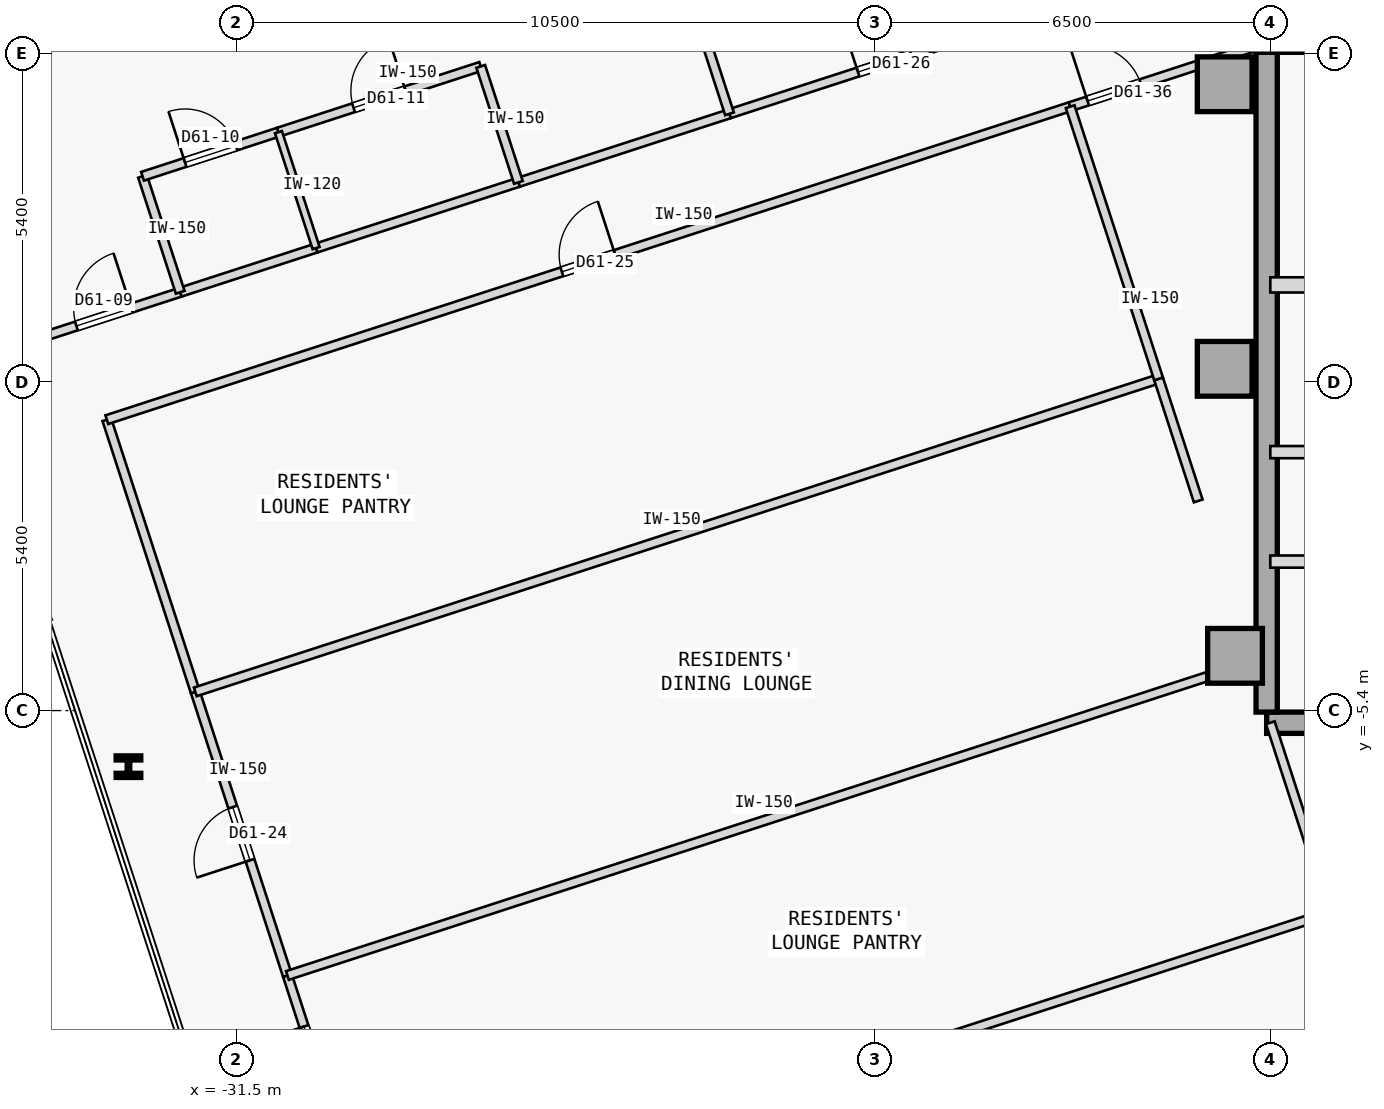
"""IFC4 building model, lengths in metres.
Left out: names, types, materials, properties, quantities, classifications, styles, units other than length and angle.
Written with IfcOpenShell. Run it as: python <this file> out.ifc"""

import sys

from ifc_helpers import new_model, si_unit, direction, frame, frame_2d, origin, origin_2d, place, context, subcontext, project, spatial, rectangle, i_section, extrude, element, fill, save


model = new_model("IFC4")
c1 = context("Model", 3, precision=1e-05, world=origin(), true_north=direction((0.0, 1.0)))
c2 = subcontext(c1, "Body", "Model", "MODEL_VIEW")
j1 = project(units=[si_unit("LENGTHUNIT", "METRE"), si_unit("PLANEANGLEUNIT", "RADIAN")], contexts=[c1])
p1 = place(None, origin())
s1 = spatial("IfcSite", under=j1, at=p1, CompositionType="ELEMENT")
p2 = place(p1, origin())
s2 = spatial("IfcBuilding", under=s1, at=p2, CompositionType="ELEMENT")
p3 = place(p2, frame((0.0, 0.0, 231.0)))
s3 = spatial("IfcBuildingStorey", under=s2, at=p3, CompositionType="ELEMENT", Elevation=231.0)
for number, where, z_axis, x_axis in (
    (1, (-15.25, 4.9, 0.0), (0.0, 0.0, 1.0), (1.0, 0.0, 0.0)),
    (2, (-15.25, 0.22, 0.0), (0.0, 0.0, 1.0), (1.0, 0.0, 0.0)),
    (3, (-15.08, -4.5, 0.0), (0.0, 0.0, 1.0), (1.0, 0.0, 0.0)),
):
    element("IfcColumn", number, at=place(p3, frame(where, z_axis=z_axis, x_axis=x_axis)), inside=s3, PredefinedType="COLUMN", context=c2, shape_type="SweptSolid", body=[
        extrude(rectangle(XDim=0.9, YDim=0.9, at=origin_2d()), origin(), (0.0, 0.0, 1.0), 3.35),
    ])
p4 = place(p3, frame((-14.56, -5.6, 0.0), z_axis=(0.0, 0.0, 1.0), x_axis=(1.0, 0.0, 0.0)))
e4 = element("IfcWall", 4, at=p4, inside=s3, PredefinedType="SHEAR", context=c2, shape_type="SweptSolid", body=[
    extrude(rectangle(XDim=10.86, YDim=0.35, at=frame_2d((5.43, 0.0))), origin(), (0.0, 0.0, 1.0), 3.125),
])
p5 = place(p3, frame((-14.56, -5.425, 0.0), z_axis=(0.0, 0.0, 1.0), x_axis=(0.0, 1.0, 0.0)))
e5 = element("IfcWall", 5, at=p5, inside=s3, PredefinedType="SHEAR", context=c2, shape_type="SweptSolid", body=[
    extrude(rectangle(XDim=10.85, YDim=0.35, at=frame_2d((5.425, 0.0))), origin(), (0.0, 0.0, 1.0), 3.125),
])
p6 = place(p3, frame((-33.278, -6.322, 0.0), z_axis=(0.0, 0.0, 1.0), x_axis=(1.0, 0.0, 0.0)))
e6 = element("IfcColumn", 6, at=p6, inside=s3, PredefinedType="COLUMN", context=c2, shape_type="SweptSolid", body=[
    extrude(i_section(OverallWidth=0.405, OverallDepth=0.355, WebThickness=0.042, FlangeThickness=0.068, FilletRadius=0.015, at=origin_2d()), origin(), (0.0, 0.0, 1.0), 3.35),
])
p7 = place(p3, frame((-14.5, 1.6, 0.0), z_axis=(0.0, 0.0, 1.0), x_axis=(1.0, 0.0, 0.0)))
e7 = element("IfcWall", 7, at=p7, inside=s3, PredefinedType="STANDARD", context=c2, shape_type="SweptSolid", body=[
    extrude(rectangle(XDim=3.6, YDim=0.25, at=frame_2d((1.8, 0.0))), origin(), (0.0, 0.0, 1.0), 3.125),
])
p8 = place(p7, frame((0.92, 0.0, 0.0)))
e8 = element("IfcOpeningElement", 8, at=p8, cuts=e7, PredefinedType="OPENING", context=c2, shape_type="SweptSolid", body=[
    extrude(rectangle(XDim=1.05, YDim=2.15, at=frame_2d((0.525, 1.075))), frame((0.0, 0.135, 0.0), z_axis=(0.0, -1.0, 0.0), x_axis=(1.0, 0.0, 0.0)), (0.0, 0.0, 1.0), 0.27),
])
p9 = place(p3, frame((-14.5, -1.15, 0.0), z_axis=(0.0, 0.0, 1.0), x_axis=(1.0, 0.0, 0.0)))
e9 = element("IfcWall", 9, at=p9, inside=s3, PredefinedType="STANDARD", context=c2, shape_type="SweptSolid", body=[
    extrude(rectangle(XDim=2.95, YDim=0.2, at=frame_2d((1.475, 0.0))), origin(), (0.0, 0.0, 1.0), 3.125),
])
p10 = place(p9, frame((0.75, 0.0, 0.0)))
e10 = element("IfcOpeningElement", 10, at=p10, cuts=e9, PredefinedType="OPENING", context=c2, shape_type="SweptSolid", body=[
    extrude(rectangle(XDim=1.05, YDim=2.18, at=frame_2d((0.525, 1.09))), frame((0.0, 0.11, 0.0), z_axis=(0.0, -1.0, 0.0), x_axis=(1.0, 0.0, 0.0)), (0.0, 0.0, 1.0), 0.22),
])
p11 = place(p3, frame((-14.5, -2.95, 0.0), z_axis=(0.0, 0.0, 1.0), x_axis=(1.0, 0.0, 0.0)))
e11 = element("IfcWall", 11, at=p11, inside=s3, PredefinedType="STANDARD", context=c2, shape_type="SweptSolid", body=[
    extrude(rectangle(XDim=10.8, YDim=0.2, at=frame_2d((5.4, 0.0))), origin(), (0.0, 0.0, 1.0), 3.125),
])
p12 = place(p11, frame((9.17, 0.0, 0.0)))
e12 = element("IfcOpeningElement", 12, at=p12, cuts=e11, PredefinedType="OPENING", context=c2, shape_type="SweptSolid", body=[
    extrude(rectangle(XDim=1.1, YDim=2.15, at=frame_2d((0.55, 1.075))), frame((0.0, 0.11, 0.0), z_axis=(0.0, -1.0, 0.0), x_axis=(1.0, 0.0, 0.0)), (0.0, 0.0, 1.0), 0.22),
])
p13 = place(p11, frame((2.33, 0.0, 0.0)))
e13 = element("IfcOpeningElement", 13, at=p13, cuts=e11, PredefinedType="OPENING", context=c2, shape_type="SweptSolid", body=[
    extrude(rectangle(XDim=0.92, YDim=2.15, at=frame_2d((0.46, 1.075))), frame((0.0, 0.11, 0.0), z_axis=(0.0, -1.0, 0.0), x_axis=(1.0, 0.0, 0.0)), (0.0, 0.0, 1.0), 0.22),
])
p14 = place(p11, frame((6.65, 0.0, 0.0)))
e14 = element("IfcOpeningElement", 14, at=p14, cuts=e11, PredefinedType="OPENING", context=c2, shape_type="SweptSolid", body=[
    extrude(rectangle(XDim=0.92, YDim=2.15, at=frame_2d((0.46, 1.075))), frame((0.0, 0.11, 0.0), z_axis=(0.0, -1.0, 0.0), x_axis=(1.0, 0.0, 0.0)), (0.0, 0.0, 1.0), 0.22),
])
p15 = place(p3, frame((-36.012, 0.314, 0.0), z_axis=(0.0, 0.0, 1.0), x_axis=(0.951071182868, 0.308971851659, 0.0)))
e15 = element("IfcWall", 15, at=p15, inside=s3, PredefinedType="PARTITIONING", context=c2, shape_type="SweptSolid", body=[
    extrude(rectangle(XDim=3.77, YDim=0.15, at=frame_2d((1.885, 0.0))), origin(), (0.0, 0.0, 1.0), 3.125),
])
p16 = place(p15, frame((1.976, 0.0, 0.0)))
e16 = element("IfcOpeningElement", 16, at=p16, cuts=e15, PredefinedType="OPENING", context=c2, shape_type="SweptSolid", body=[
    extrude(rectangle(XDim=0.95, YDim=2.15, at=frame_2d((0.475, 1.075))), frame((0.0, 0.085, 0.0), z_axis=(0.0, -1.0, 0.0), x_axis=(1.0, 0.0, 0.0)), (0.0, 0.0, 1.0), 0.17),
])
p17 = place(p3, frame((-26.865, 3.286, 0.0), z_axis=(0.0, 0.0, 1.0), x_axis=(0.951057168147, 0.309014988174, 0.0)))
e17 = element("IfcWall", 17, at=p17, inside=s3, PredefinedType="PARTITIONING", context=c2, shape_type="SweptSolid", body=[
    extrude(rectangle(XDim=3.65, YDim=0.15, at=frame_2d((1.825, 0.0))), origin(), (0.0, 0.0, 1.0), 3.125),
])
p18 = place(p3, frame((-32.427, 1.479, 0.0), z_axis=(0.0, 0.0, 1.0), x_axis=(0.951045519245, 0.309050837767, 0.0)))
e18 = element("IfcWall", 18, at=p18, inside=s3, PredefinedType="PARTITIONING", context=c2, shape_type="SweptSolid", body=[
    extrude(rectangle(XDim=2.35, YDim=0.15, at=frame_2d((1.175, 0.0))), origin(), (0.0, 0.0, 1.0), 3.125),
])
p19 = place(p3, frame((-30.192, 2.205, 0.0), z_axis=(0.0, 0.0, 1.0), x_axis=(0.951063814176, 0.308994532905, 0.0)))
e19 = element("IfcWall", 19, at=p19, inside=s3, PredefinedType="PARTITIONING", context=c2, shape_type="SweptSolid", body=[
    extrude(rectangle(XDim=3.498, YDim=0.15, at=frame_2d((1.749, 0.0))), origin(), (0.0, 0.0, 1.0), 3.125),
])
p20 = place(p3, frame((-29.833, -12.311, 0.0), z_axis=(0.0, 0.0, 1.0), x_axis=(-0.309044953986, 0.951047431213, 0.0)))
e20 = element("IfcWall", 20, at=p20, inside=s3, PredefinedType="PARTITIONING", context=c2, shape_type="SweptSolid", body=[
    extrude(rectangle(XDim=2.685, YDim=0.15, at=frame_2d((1.343, 0.0))), origin(), (0.0, 0.0, 1.0), 3.125),
])
p21 = place(p20, frame((0.883, 0.0, 0.0)))
e21 = element("IfcOpeningElement", 21, at=p21, cuts=e20, PredefinedType="OPENING", context=c2, shape_type="SweptSolid", body=[
    extrude(rectangle(XDim=0.92, YDim=2.15, at=frame_2d((0.46, 1.075))), frame((0.0, 0.085, 0.0), z_axis=(0.0, -1.0, 0.0), x_axis=(1.0, 0.0, 0.0)), (0.0, 0.0, 1.0), 0.17),
])
p22 = place(p3, frame((-30.663, -9.757, 0.0), z_axis=(0.0, 0.0, 1.0), x_axis=(-0.309019653166, 0.951055652397, 0.0)))
e22 = element("IfcWall", 22, at=p22, inside=s3, PredefinedType="PARTITIONING", context=c2, shape_type="SweptSolid", body=[
    extrude(rectangle(XDim=4.904, YDim=0.15, at=frame_2d((2.452, 0.0))), origin(), (0.0, 0.0, 1.0), 3.125),
])
p23 = place(p22, frame((1.992, 0.0, 0.0)))
e23 = element("IfcOpeningElement", 23, at=p23, cuts=e22, PredefinedType="OPENING", context=c2, shape_type="SweptSolid", body=[
    extrude(rectangle(XDim=0.92, YDim=2.15, at=frame_2d((0.46, 1.075))), frame((0.0, 0.085, 0.0), z_axis=(0.0, -1.0, 0.0), x_axis=(1.0, 0.0, 0.0)), (0.0, 0.0, 1.0), 0.17),
])
p24 = place(p3, frame((-32.179, -5.093, 0.0), z_axis=(0.0, 0.0, 1.0), x_axis=(-0.309014532869, 0.951057316083, 0.0)))
e24 = element("IfcWall", 24, at=p24, inside=s3, PredefinedType="PARTITIONING", context=c2, shape_type="SweptSolid", body=[
    extrude(rectangle(XDim=4.707, YDim=0.15, at=frame_2d((2.354, 0.0))), origin(), (0.0, 0.0, 1.0), 3.125),
])
p25 = place(p3, frame((-33.633, -0.616, 0.0), z_axis=(0.0, 0.0, 1.0), x_axis=(0.951058192995, 0.309011833974, 0.0)))
e25 = element("IfcWall", 25, at=p25, inside=s3, PredefinedType="PARTITIONING", context=c2, shape_type="SweptSolid", body=[
    extrude(rectangle(XDim=16.657, YDim=0.15, at=frame_2d((8.329, 0.0))), origin(), (0.0, 0.0, 1.0), 3.125),
])
p26 = place(p25, frame((7.868, 0.0, 0.0)))
e26 = element("IfcOpeningElement", 26, at=p26, cuts=e25, PredefinedType="OPENING", context=c2, shape_type="SweptSolid", body=[
    extrude(rectangle(XDim=0.92, YDim=2.15, at=frame_2d((0.46, 1.075))), frame((0.0, 0.085, 0.0), z_axis=(0.0, -1.0, 0.0), x_axis=(1.0, 0.0, 0.0)), (0.0, 0.0, 1.0), 0.17),
])
p27 = place(p3, frame((-23.394, 4.414, 0.0), z_axis=(0.0, 0.0, 1.0), x_axis=(0.951050121956, 0.309036673434, 0.0)))
e27 = element("IfcWall", 27, at=p27, inside=s3, PredefinedType="PARTITIONING", context=c2, shape_type="SweptSolid", body=[
    extrude(rectangle(XDim=5.364, YDim=0.15, at=frame_2d((2.682, 0.0))), origin(), (0.0, 0.0, 1.0), 3.125),
])
p28 = place(p27, frame((2.222, 0.0, 0.0)))
e28 = element("IfcOpeningElement", 28, at=p28, cuts=e27, PredefinedType="OPENING", context=c2, shape_type="SweptSolid", body=[
    extrude(rectangle(XDim=0.92, YDim=2.15, at=frame_2d((0.46, 1.075))), frame((0.0, 0.085, 0.0), z_axis=(0.0, -1.0, 0.0), x_axis=(1.0, 0.0, 0.0)), (0.0, 0.0, 1.0), 0.17),
])
p29 = place(p3, frame((-17.792, 4.531, 0.0), z_axis=(0.0, 0.0, 1.0), x_axis=(0.951047546178, 0.309044600193, 0.0)))
e29 = element("IfcWall", 29, at=p29, inside=s3, PredefinedType="PARTITIONING", context=c2, shape_type="SweptSolid", body=[
    extrude(rectangle(XDim=3.461, YDim=0.15, at=frame_2d((1.73, 0.0))), origin(), (0.0, 0.0, 1.0), 3.125),
])
p30 = place(p29, frame((0.302, 0.0, 0.0)))
e30 = element("IfcOpeningElement", 30, at=p30, cuts=e29, PredefinedType="OPENING", context=c2, shape_type="SweptSolid", body=[
    extrude(rectangle(XDim=0.92, YDim=2.15, at=frame_2d((0.46, 1.075))), frame((0.0, 0.085, 0.0), z_axis=(0.0, -1.0, 0.0), x_axis=(1.0, 0.0, 0.0)), (0.0, 0.0, 1.0), 0.17),
])
p31 = place(p3, frame((-32.427, 1.479, 0.0), z_axis=(0.0, 0.0, 1.0), x_axis=(-0.309022749039, 0.951054646472, 0.0)))
e31 = element("IfcWall", 31, at=p31, inside=s3, PredefinedType="PARTITIONING", context=c2, shape_type="SweptSolid", body=[
    extrude(rectangle(XDim=2.005, YDim=0.15, at=frame_2d((1.002, 0.0))), origin(), (0.0, 0.0, 1.0), 3.125),
])
p32 = place(p3, frame((-33.046, 3.386, 0.0), z_axis=(0.0, 0.0, 1.0), x_axis=(0.951045519245, 0.309050837767, 0.0)))
e32 = element("IfcWall", 32, at=p32, inside=s3, PredefinedType="PARTITIONING", context=c2, shape_type="SweptSolid", body=[
    extrude(rectangle(XDim=2.35, YDim=0.15, at=frame_2d((1.175, 0.0))), origin(), (0.0, 0.0, 1.0), 3.125),
])
p33 = place(p32, frame((0.735, 0.0, 0.0)))
e33 = element("IfcOpeningElement", 33, at=p33, cuts=e32, PredefinedType="OPENING", context=c2, shape_type="SweptSolid", body=[
    extrude(rectangle(XDim=0.88, YDim=2.15, at=frame_2d((0.44, 1.075))), frame((0.0, 0.085, 0.0), z_axis=(0.0, -1.0, 0.0), x_axis=(1.0, 0.0, 0.0)), (0.0, 0.0, 1.0), 0.17),
])
p34 = place(p3, frame((-30.811, 4.112, 0.0), z_axis=(0.0, 0.0, 1.0), x_axis=(0.951063814176, 0.308994532905, 0.0)))
e34 = element("IfcWall", 34, at=p34, inside=s3, PredefinedType="PARTITIONING", context=c2, shape_type="SweptSolid", body=[
    extrude(rectangle(XDim=3.498, YDim=0.15, at=frame_2d((1.749, 0.0))), origin(), (0.0, 0.0, 1.0), 3.125),
])
p35 = place(p34, frame((1.299, 0.0, 0.0)))
e35 = element("IfcOpeningElement", 35, at=p35, cuts=e34, PredefinedType="OPENING", context=c2, shape_type="SweptSolid", body=[
    extrude(rectangle(XDim=0.9, YDim=2.15, at=frame_2d((0.45, 1.075))), frame((0.0, 0.085, 0.0), z_axis=(0.0, -1.0, 0.0), x_axis=(1.0, 0.0, 0.0)), (0.0, 0.0, 1.0), 0.17),
])
p36 = place(p3, frame((-26.865, 3.286, 0.0), z_axis=(0.0, 0.0, 1.0), x_axis=(-0.309022749039, 0.951054646472, 0.0)))
e36 = element("IfcWall", 36, at=p36, inside=s3, PredefinedType="PARTITIONING", context=c2, shape_type="SweptSolid", body=[
    extrude(rectangle(XDim=2.005, YDim=0.15, at=frame_2d((1.002, 0.0))), origin(), (0.0, 0.0, 1.0), 3.125),
])
p37 = place(p3, frame((-23.394, 4.414, 0.0), z_axis=(0.0, 0.0, 1.0), x_axis=(-0.308976906612, 0.951069540665, 0.0)))
e37 = element("IfcWall", 37, at=p37, inside=s3, PredefinedType="PARTITIONING", context=c2, shape_type="SweptSolid", body=[
    extrude(rectangle(XDim=2.579, YDim=0.15, at=frame_2d((1.29, 0.0))), origin(), (0.0, 0.0, 1.0), 3.125),
])
p38 = place(p3, frame((-30.192, 2.205, 0.0), z_axis=(0.0, 0.0, 1.0), x_axis=(-0.309022749039, 0.951054646472, 0.0)))
e38 = element("IfcWall", 38, at=p38, inside=s3, PredefinedType="PARTITIONING", context=c2, shape_type="SweptSolid", body=[
    extrude(rectangle(XDim=2.005, YDim=0.12, at=frame_2d((1.002, 0.0))), origin(), (0.0, 0.0, 1.0), 3.125),
])
p39 = place(p3, frame((-31.208, -14.471, 0.0), z_axis=(0.0, 0.0, 1.0), x_axis=(0.951057753948, 0.309013185244, 0.0)))
e39 = element("IfcWall", 39, at=p39, inside=s3, PredefinedType="PARTITIONING", context=c2, shape_type="SweptSolid", body=[
    extrude(rectangle(XDim=18.632, YDim=0.15, at=frame_2d((9.316, 0.0))), origin(), (0.0, 0.0, 1.0), 3.125),
])
p40 = place(p3, frame((-30.663, -9.757, 0.0), z_axis=(0.0, 0.0, 1.0), x_axis=(0.951058192995, 0.309011833974, 0.0)))
e40 = element("IfcWall", 40, at=p40, inside=s3, PredefinedType="PARTITIONING", context=c2, shape_type="SweptSolid", body=[
    extrude(rectangle(XDim=16.657, YDim=0.15, at=frame_2d((8.329, 0.0))), origin(), (0.0, 0.0, 1.0), 3.125),
])
p41 = place(p3, frame((-13.488, -8.713, 0.0), z_axis=(0.0, 0.0, 1.0), x_axis=(-0.309082700143, 0.951035164687, 0.0)))
e41 = element("IfcWall", 41, at=p41, inside=s3, PredefinedType="PARTITIONING", context=c2, shape_type="SweptSolid", body=[
    extrude(rectangle(XDim=3.274, YDim=0.15, at=frame_2d((1.637, 0.0))), origin(), (0.0, 0.0, 1.0), 3.125),
])
p42 = place(p3, frame((-32.179, -5.093, 0.0), z_axis=(0.0, 0.0, 1.0), x_axis=(0.951053885426, 0.309025091239, 0.0)))
e42 = element("IfcWall", 42, at=p42, inside=s3, PredefinedType="PARTITIONING", context=c2, shape_type="SweptSolid", body=[
    extrude(rectangle(XDim=16.657, YDim=0.15, at=frame_2d((8.329, 0.0))), origin(), (0.0, 0.0, 1.0), 3.125),
])
p43 = place(p3, frame((-15.685, -1.952, 0.0), z_axis=(0.0, 0.0, 1.0), x_axis=(-0.308929092959, 0.951085072706, 0.0)))
e43 = element("IfcWall", 43, at=p43, inside=s3, PredefinedType="PARTITIONING", context=c2, shape_type="SweptSolid", body=[
    extrude(rectangle(XDim=2.11, YDim=0.15, at=frame_2d((1.055, 0.0))), origin(), (0.0, 0.0, 1.0), 3.125),
])
p44 = place(p3, frame((-16.337, 0.054, 0.0), z_axis=(0.0, 0.0, 1.0), x_axis=(-0.309029776355, 0.951052363083, 0.0)))
e44 = element("IfcWall", 44, at=p44, inside=s3, PredefinedType="PARTITIONING", context=c2, shape_type="SweptSolid", body=[
    extrude(rectangle(XDim=4.707, YDim=0.15, at=frame_2d((2.354, 0.0))), origin(), (0.0, 0.0, 1.0), 3.125),
])
p45 = place(p16, origin())
e45 = element("IfcDoor", 45, at=p45, inside=s3, OperationType="SINGLE_SWING_RIGHT", PredefinedType="DOOR", context=c2, shape_type="SweptSolid", body=[
    extrude(rectangle(XDim=0.95, YDim=2.15, at=frame_2d((0.475, 1.075))), frame((0.0, 0.025, 0.0), z_axis=(0.0, -1.0, 0.0), x_axis=(1.0, 0.0, 0.0)), (0.0, 0.0, 1.0), 0.05),
])
fill(e16, e45)
p46 = place(p33, origin())
e46 = element("IfcDoor", 46, at=p46, inside=s3, OperationType="SINGLE_SWING_LEFT", PredefinedType="DOOR", context=c2, shape_type="SweptSolid", body=[
    extrude(rectangle(XDim=0.88, YDim=2.15, at=frame_2d((0.44, 1.075))), frame((0.0, 0.025, 0.0), z_axis=(0.0, -1.0, 0.0), x_axis=(1.0, 0.0, 0.0)), (0.0, 0.0, 1.0), 0.05),
])
fill(e33, e46)
p47 = place(p35, origin())
e47 = element("IfcDoor", 47, at=p47, inside=s3, OperationType="SINGLE_SWING_RIGHT", PredefinedType="DOOR", context=c2, shape_type="SweptSolid", body=[
    extrude(rectangle(XDim=0.9, YDim=2.15, at=frame_2d((0.45, 1.075))), frame((0.0, 0.025, 0.0), z_axis=(0.0, -1.0, 0.0), x_axis=(1.0, 0.0, 0.0)), (0.0, 0.0, 1.0), 0.05),
])
fill(e35, e47)
p48 = place(p21, origin())
e48 = element("IfcDoor", 48, at=p48, inside=s3, OperationType="SINGLE_SWING_RIGHT", PredefinedType="DOOR", context=c2, shape_type="SweptSolid", body=[
    extrude(rectangle(XDim=0.92, YDim=2.15, at=frame_2d((0.46, 1.075))), frame((0.0, 0.025, 0.0), z_axis=(0.0, -1.0, 0.0), x_axis=(1.0, 0.0, 0.0)), (0.0, 0.0, 1.0), 0.05),
])
fill(e21, e48)
p49 = place(p23, origin())
e49 = element("IfcDoor", 49, at=p49, inside=s3, OperationType="SINGLE_SWING_LEFT", PredefinedType="DOOR", context=c2, shape_type="SweptSolid", body=[
    extrude(rectangle(XDim=0.92, YDim=2.15, at=frame_2d((0.46, 1.075))), frame((0.0, 0.025, 0.0), z_axis=(0.0, -1.0, 0.0), x_axis=(1.0, 0.0, 0.0)), (0.0, 0.0, 1.0), 0.05),
])
fill(e23, e49)
p50 = place(p26, origin())
e50 = element("IfcDoor", 50, at=p50, inside=s3, OperationType="SINGLE_SWING_RIGHT", PredefinedType="DOOR", context=c2, shape_type="SweptSolid", body=[
    extrude(rectangle(XDim=0.92, YDim=2.15, at=frame_2d((0.46, 1.075))), frame((0.0, 0.025, 0.0), z_axis=(0.0, -1.0, 0.0), x_axis=(1.0, 0.0, 0.0)), (0.0, 0.0, 1.0), 0.05),
])
fill(e26, e50)
p51 = place(p28, origin())
e51 = element("IfcDoor", 51, at=p51, inside=s3, OperationType="SINGLE_SWING_LEFT", PredefinedType="DOOR", context=c2, shape_type="SweptSolid", body=[
    extrude(rectangle(XDim=0.92, YDim=2.15, at=frame_2d((0.46, 1.075))), frame((0.0, 0.025, 0.0), z_axis=(0.0, -1.0, 0.0), x_axis=(1.0, 0.0, 0.0)), (0.0, 0.0, 1.0), 0.05),
])
fill(e28, e51)
p52 = place(p30, origin())
e52 = element("IfcDoor", 52, at=p52, inside=s3, OperationType="SINGLE_SWING_LEFT", PredefinedType="DOOR", context=c2, shape_type="SweptSolid", body=[
    extrude(rectangle(XDim=0.92, YDim=2.15, at=frame_2d((0.46, 1.075))), frame((0.0, 0.025, 0.0), z_axis=(0.0, -1.0, 0.0), x_axis=(1.0, 0.0, 0.0)), (0.0, 0.0, 1.0), 0.05),
])
fill(e30, e52)
save(model, sys.argv[1])
